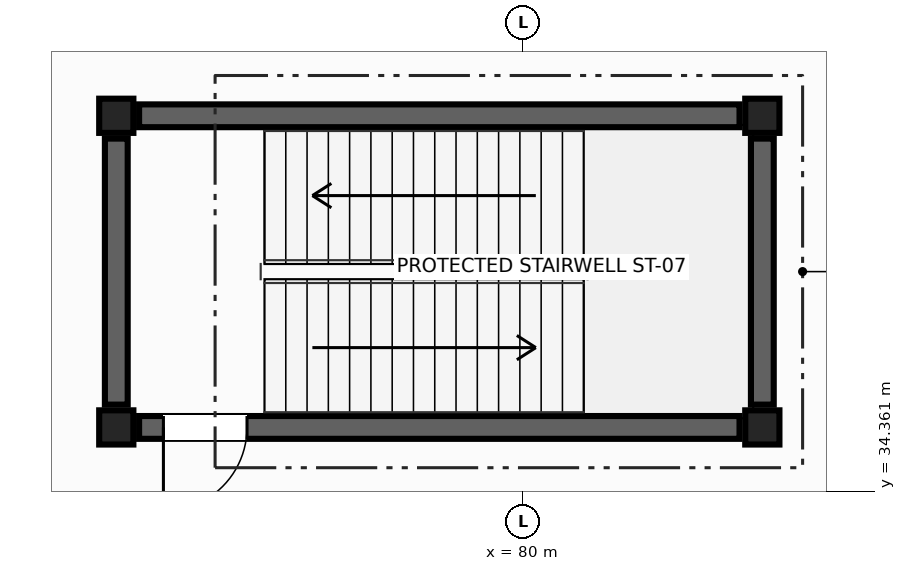
"""IFC4 building model, lengths in metres.
Left out: names, types, materials, properties, quantities, classifications, styles, units other than length and angle.
Written with IfcOpenShell. Run it as: python <this file> out.ifc"""

import sys

from ifc_helpers import new_model, si_unit, direction, frame, frame_2d, origin, origin_2d, place, context, subcontext, project, spatial, rectangle, extrude, element, fill, save


model = new_model("IFC4")
c1 = context("Model", 3, precision=1e-05, world=origin(), true_north=direction((0.0, 1.0)))
c2 = subcontext(c1, "Body", "Model", "MODEL_VIEW")
j1 = project(units=[si_unit("LENGTHUNIT", "METRE"), si_unit("PLANEANGLEUNIT", "RADIAN")], contexts=[c1])
p1 = place(None, origin())
s1 = spatial("IfcSite", under=j1, at=p1, CompositionType="ELEMENT")
p2 = place(p1, origin())
s2 = spatial("IfcBuilding", under=s1, at=p2, CompositionType="ELEMENT")
p3 = place(p2, origin())
s3 = spatial("IfcBuildingStorey", under=s2, at=p3, CompositionType="ELEMENT", Elevation=0.0)
for number, where, z_axis, x_axis in (
    (1, (74.65, 35.2, 0.0), (0.0, 0.0, 1.0), (1.0, 0.0, 0.0)),
    (2, (83.15, 35.2, 0.0), (0.0, 0.0, 1.0), (1.0, 0.0, 0.0)),
    (3, (83.15, 39.3, 0.0), (0.0, 0.0, 1.0), (1.0, 0.0, 0.0)),
    (4, (74.65, 39.3, 0.0), (0.0, 0.0, 1.0), (1.0, 0.0, 0.0)),
):
    element("IfcColumn", number, at=place(p3, frame(where, z_axis=z_axis, x_axis=x_axis)), inside=s3, PredefinedType="COLUMN", context=c2, shape_type="SweptSolid", body=[
        extrude(rectangle(XDim=0.45, YDim=0.45, at=origin_2d()), origin(), (0.0, 0.0, 1.0), 5.4),
    ])
p4 = place(p3, frame((82.85, 35.2, 0.0), z_axis=(0.0, 0.0, 1.0), x_axis=(-1.0, 0.0, 0.0)))
e5 = element("IfcWall", 5, at=p4, inside=s3, PredefinedType="SHEAR", context=c2, shape_type="SweptSolid", body=[
    extrude(rectangle(XDim=7.9, YDim=0.3, at=frame_2d((3.95, 0.0))), origin(), (0.0, 0.0, 1.0), 5.1),
])
p5 = place(p4, frame((6.48, 0.0, 0.0)))
e6 = element("IfcOpeningElement", 6, at=p5, cuts=e5, PredefinedType="OPENING", context=c2, shape_type="SweptSolid", body=[
    extrude(rectangle(XDim=1.1, YDim=2.15, at=frame_2d((0.55, 1.075))), frame((0.0, 0.16, 0.0), z_axis=(0.0, -1.0, 0.0), x_axis=(1.0, 0.0, 0.0)), (0.0, 0.0, 1.0), 0.32),
])
p6 = place(p3, frame((74.65, 35.5, 0.0), z_axis=(0.0, 0.0, 1.0), x_axis=(0.0, 1.0, 0.0)))
e7 = element("IfcWall", 7, at=p6, inside=s3, PredefinedType="SHEAR", context=c2, shape_type="SweptSolid", body=[
    extrude(rectangle(XDim=3.5, YDim=0.3, at=frame_2d((1.75, 0.0))), origin(), (0.0, 0.0, 1.0), 5.1),
])
p7 = place(p3, frame((74.95, 39.3, 0.0), z_axis=(0.0, 0.0, 1.0), x_axis=(1.0, 0.0, 0.0)))
e8 = element("IfcWall", 8, at=p7, inside=s3, PredefinedType="SHEAR", context=c2, shape_type="SweptSolid", body=[
    extrude(rectangle(XDim=7.9, YDim=0.3, at=frame_2d((3.95, 0.0))), origin(), (0.0, 0.0, 1.0), 5.1),
])
p8 = place(p3, frame((83.15, 39.0, 0.0), z_axis=(0.0, 0.0, 1.0), x_axis=(0.0, -1.0, 0.0)))
e9 = element("IfcWall", 9, at=p8, inside=s3, PredefinedType="SHEAR", context=c2, shape_type="SweptSolid", body=[
    extrude(rectangle(XDim=3.5, YDim=0.3, at=frame_2d((1.75, 0.0))), origin(), (0.0, 0.0, 1.0), 5.1),
])
p9 = place(p5, origin())
e10 = element("IfcDoor", 10, at=p9, inside=s3, OperationType="SINGLE_SWING_RIGHT", PredefinedType="DOOR", context=c2, shape_type="SweptSolid", body=[
    extrude(rectangle(XDim=1.1, YDim=2.15, at=frame_2d((0.55, 1.075))), frame((0.0, 0.025, 0.0), z_axis=(0.0, -1.0, 0.0), x_axis=(1.0, 0.0, 0.0)), (0.0, 0.0, 1.0), 0.05),
])
fill(e6, e10)
save(model, sys.argv[1])
